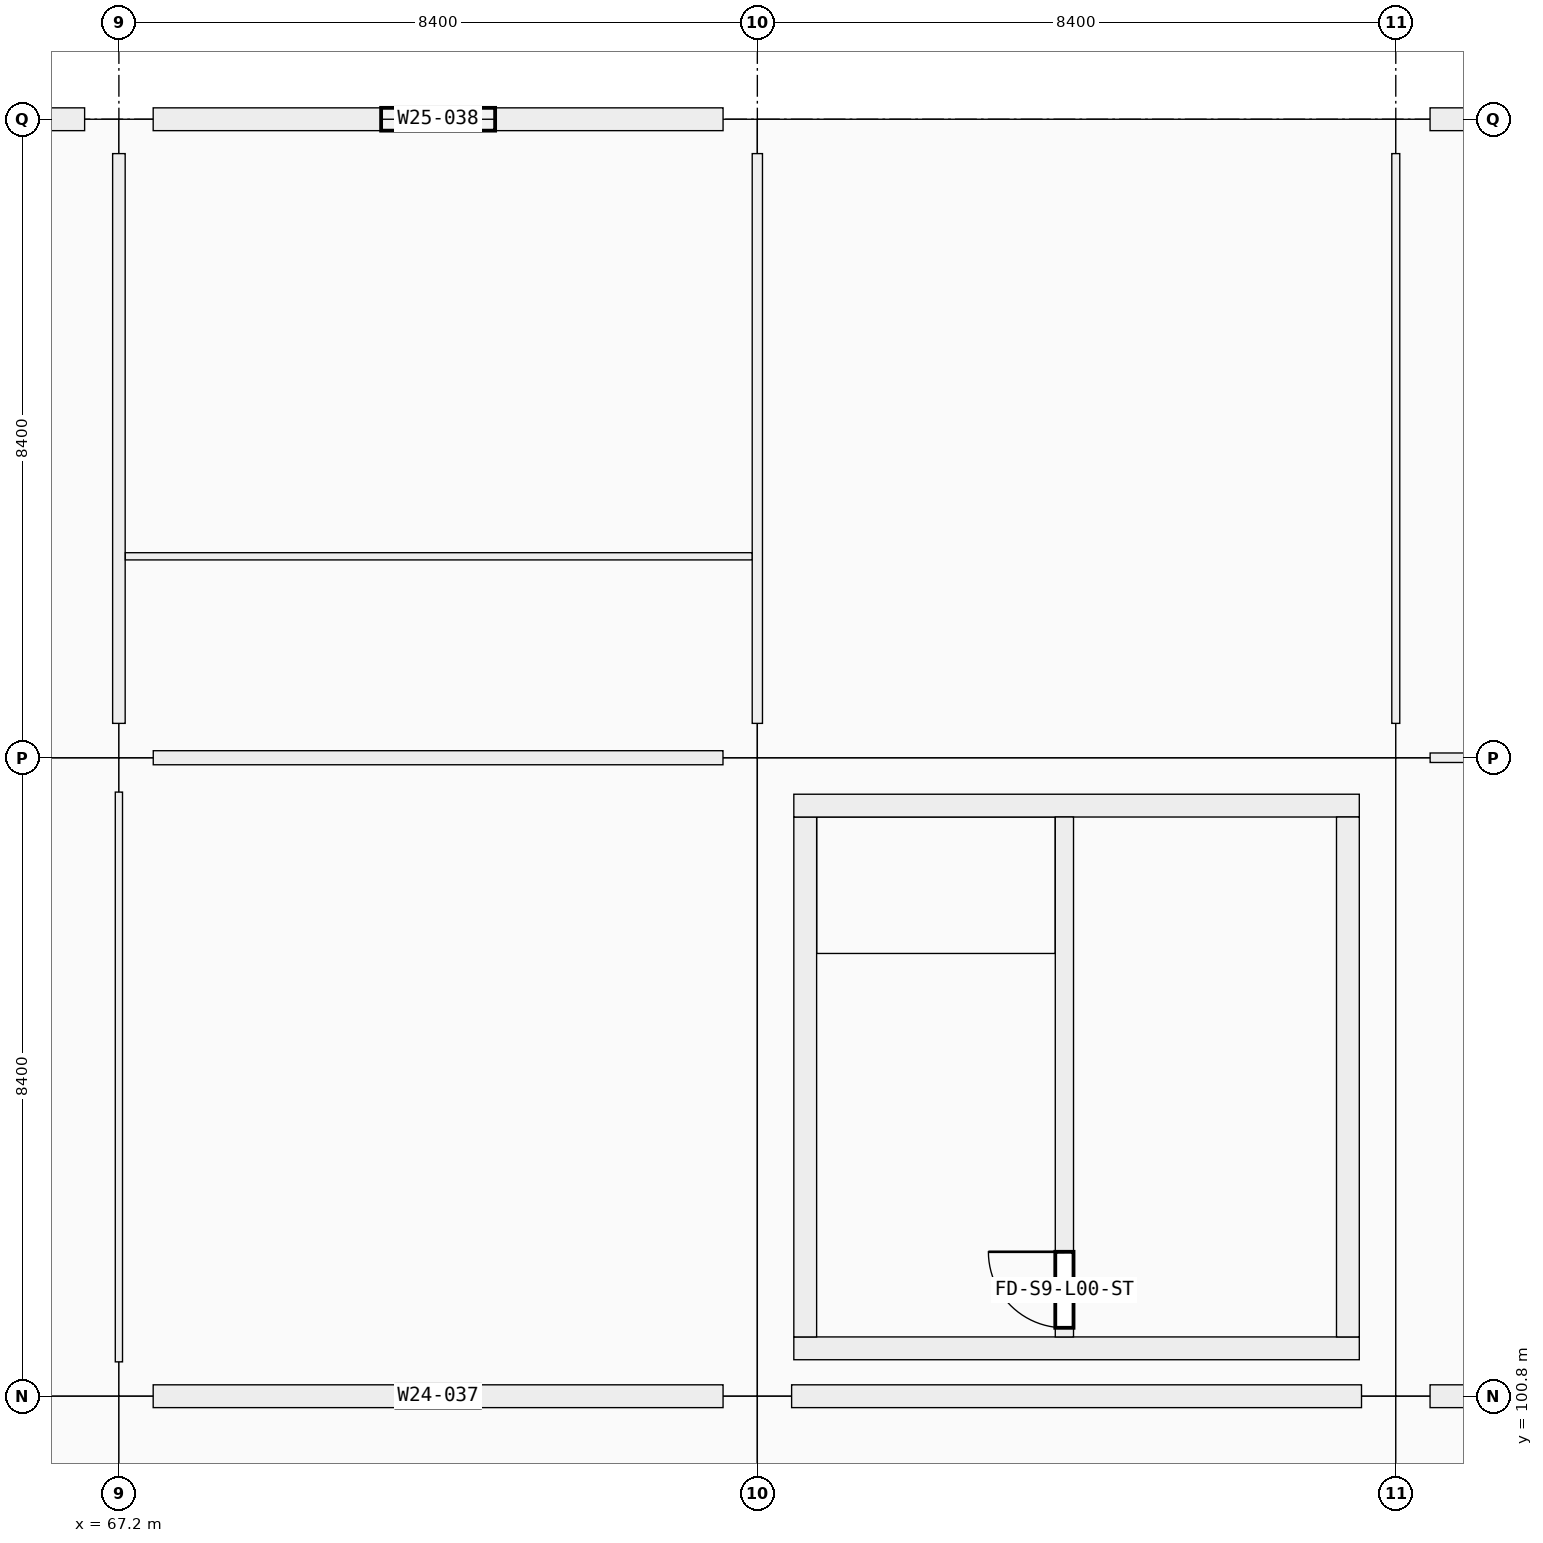
"""IFC4 building model, lengths in metres.
Left out: names, types, materials, properties, quantities, classifications, styles, units other than length and angle.
Written with IfcOpenShell. Run it as: python <this file> out.ifc"""

import sys

from ifc_helpers import new_model, si_unit, direction, frame, frame_2d, origin, origin_2d, place, context, subcontext, project, spatial, rectangle, extrude, element, fill, save


model = new_model("IFC4")
c1 = context("Model", 3, precision=1e-05, world=origin(), true_north=direction((0.0, 1.0)))
c2 = subcontext(c1, "Body", "Model", "MODEL_VIEW")
j1 = project(units=[si_unit("LENGTHUNIT", "METRE"), si_unit("PLANEANGLEUNIT", "RADIAN")], contexts=[c1])
p1 = place(None, origin())
s1 = spatial("IfcSite", under=j1, at=p1, CompositionType="ELEMENT")
p2 = place(p1, origin())
s2 = spatial("IfcBuilding", under=s1, at=p2, CompositionType="ELEMENT")
p3 = place(p2, origin())
s3 = spatial("IfcBuildingStorey", under=s2, at=p3, CompositionType="ELEMENT", Elevation=0.0)
for number, where, z_axis, x_axis in (
    (1, (67.2, 100.8, 0.0), (0.0, 0.0, 1.0), (1.0, 0.0, 0.0)),
    (2, (67.2, 109.2, 0.0), (0.0, 0.0, 1.0), (1.0, 0.0, 0.0)),
    (3, (67.2, 117.6, 0.0), (0.0, 0.0, 1.0), (1.0, 0.0, 0.0)),
    (4, (75.6, 100.8, 0.0), (0.0, 0.0, 1.0), (1.0, 0.0, 0.0)),
    (5, (75.6, 109.2, 0.0), (0.0, 0.0, 1.0), (1.0, 0.0, 0.0)),
    (6, (75.6, 117.6, 0.0), (0.0, 0.0, 1.0), (1.0, 0.0, 0.0)),
    (7, (84.0, 100.8, 0.0), (0.0, 0.0, 1.0), (1.0, 0.0, 0.0)),
    (8, (84.0, 109.2, 0.0), (0.0, 0.0, 1.0), (1.0, 0.0, 0.0)),
    (9, (84.0, 117.6, 0.0), (0.0, 0.0, 1.0), (1.0, 0.0, 0.0)),
):
    element("IfcColumn", number, at=place(p3, frame(where, z_axis=z_axis, x_axis=x_axis)), inside=s3, PredefinedType="COLUMN", context=c2, shape_type="SweptSolid", body=[
        extrude(rectangle(XDim=0.9, YDim=0.9, at=origin_2d()), origin(), (0.0, 0.0, 1.0), 5.76),
    ])
p4 = place(p3, frame((59.251, 117.6, 0.0), z_axis=(0.0, 0.0, 1.0), x_axis=(1.0, 0.0, 0.0)))
e10 = element("IfcWall", 10, at=p4, inside=s3, PredefinedType="SOLIDWALL", context=c2, shape_type="SweptSolid", body=[
    extrude(rectangle(XDim=7.498, YDim=0.3, at=frame_2d((3.749, 0.0))), origin(), (0.0, 0.0, 1.0), 4.7),
])
p5 = place(p4, frame((2.599, 0.0, 0.0)))
e11 = element("IfcOpeningElement", 11, at=p5, cuts=e10, PredefinedType="OPENING", context=c2, shape_type="SweptSolid", body=[
    extrude(rectangle(XDim=2.3, YDim=2.3, at=frame_2d((1.15, 1.15))), frame((0.0, 0.15, 0.0), z_axis=(0.0, -1.0, 0.0), x_axis=(1.0, 0.0, 0.0)), (0.0, 0.0, 1.0), 0.3),
])
p6 = place(p3, frame((75.149, 100.8, 0.0), z_axis=(0.0, 0.0, 1.0), x_axis=(-1.0, 0.0, 0.0)))
e12 = element("IfcWall", 12, at=p6, inside=s3, PredefinedType="SOLIDWALL", context=c2, shape_type="SweptSolid", body=[
    extrude(rectangle(XDim=7.498, YDim=0.3, at=frame_2d((3.749, 0.0))), origin(), (0.0, 0.0, 1.0), 4.7),
])
p7 = place(p6, frame((3.199, 0.0, 0.9)))
e13 = element("IfcOpeningElement", 13, at=p7, cuts=e12, PredefinedType="OPENING", context=c2, shape_type="SweptSolid", body=[
    extrude(rectangle(XDim=1.1, YDim=1.5, at=frame_2d((0.55, 0.75))), frame((0.0, 0.15, 0.0), z_axis=(0.0, -1.0, 0.0), x_axis=(1.0, 0.0, 0.0)), (0.0, 0.0, 1.0), 0.3),
])
p8 = place(p3, frame((67.651, 117.6, 0.0), z_axis=(0.0, 0.0, 1.0), x_axis=(1.0, 0.0, 0.0)))
e14 = element("IfcWall", 14, at=p8, inside=s3, PredefinedType="SOLIDWALL", context=c2, shape_type="SweptSolid", body=[
    extrude(rectangle(XDim=7.498, YDim=0.3, at=frame_2d((3.749, 0.0))), origin(), (0.0, 0.0, 1.0), 4.7),
])
p9 = place(p8, frame((2.999, 0.0, 0.9)))
e15 = element("IfcOpeningElement", 15, at=p9, cuts=e14, PredefinedType="OPENING", context=c2, shape_type="SweptSolid", body=[
    extrude(rectangle(XDim=1.5, YDim=1.2, at=frame_2d((0.75, 0.6))), frame((0.0, 0.15, 0.0), z_axis=(0.0, -1.0, 0.0), x_axis=(1.0, 0.0, 0.0)), (0.0, 0.0, 1.0), 0.3),
])
p10 = place(p3, frame((83.549, 100.8, 0.0), z_axis=(0.0, 0.0, 1.0), x_axis=(-1.0, 0.0, 0.0)))
e16 = element("IfcWall", 16, at=p10, inside=s3, PredefinedType="SOLIDWALL", context=c2, shape_type="SweptSolid", body=[
    extrude(rectangle(XDim=7.498, YDim=0.3, at=frame_2d((3.749, 0.0))), origin(), (0.0, 0.0, 1.0), 4.7),
])
p11 = place(p3, frame((91.949, 100.8, 0.0), z_axis=(0.0, 0.0, 1.0), x_axis=(-1.0, 0.0, 0.0)))
e17 = element("IfcWall", 17, at=p11, inside=s3, PredefinedType="SOLIDWALL", context=c2, shape_type="SweptSolid", body=[
    extrude(rectangle(XDim=7.498, YDim=0.3, at=frame_2d((3.749, 0.0))), origin(), (0.0, 0.0, 1.0), 4.7),
])
p12 = place(p11, frame((2.899, 0.0, 0.9)))
e18 = element("IfcOpeningElement", 18, at=p12, cuts=e17, PredefinedType="OPENING", context=c2, shape_type="SweptSolid", body=[
    extrude(rectangle(XDim=1.7, YDim=1.85, at=frame_2d((0.85, 0.925))), frame((0.0, 0.15, 0.0), z_axis=(0.0, -1.0, 0.0), x_axis=(1.0, 0.0, 0.0)), (0.0, 0.0, 1.0), 0.3),
])
p13 = place(p3, frame((84.451, 117.6, 0.0), z_axis=(0.0, 0.0, 1.0), x_axis=(1.0, 0.0, 0.0)))
e19 = element("IfcWall", 19, at=p13, inside=s3, PredefinedType="SOLIDWALL", context=c2, shape_type="SweptSolid", body=[
    extrude(rectangle(XDim=7.498, YDim=0.3, at=frame_2d((3.749, 0.0))), origin(), (0.0, 0.0, 1.0), 4.7),
])
p14 = place(p13, frame((2.599, 0.0, 0.0)))
e20 = element("IfcOpeningElement", 20, at=p14, cuts=e19, PredefinedType="OPENING", context=c2, shape_type="SweptSolid", body=[
    extrude(rectangle(XDim=2.3, YDim=2.3, at=frame_2d((1.15, 1.15))), frame((0.0, 0.15, 0.0), z_axis=(0.0, -1.0, 0.0), x_axis=(1.0, 0.0, 0.0)), (0.0, 0.0, 1.0), 0.3),
])
p15 = place(p3, frame((83.52, 101.43, 0.0), z_axis=(0.0, 0.0, 1.0), x_axis=(-1.0, 0.0, 0.0)))
e21 = element("IfcWall", 21, at=p15, inside=s3, PredefinedType="SHEAR", context=c2, shape_type="SweptSolid", body=[
    extrude(rectangle(XDim=7.44, YDim=0.3, at=frame_2d((3.72, 0.0))), origin(), (0.0, 0.0, 1.0), 5.76),
])
p16 = place(p3, frame((76.23, 101.58, 0.0), z_axis=(0.0, 0.0, 1.0), x_axis=(0.0, 1.0, 0.0)))
e22 = element("IfcWall", 22, at=p16, inside=s3, PredefinedType="SHEAR", context=c2, shape_type="SweptSolid", body=[
    extrude(rectangle(XDim=6.84, YDim=0.3, at=frame_2d((3.42, 0.0))), origin(), (0.0, 0.0, 1.0), 5.76),
])
p17 = place(p3, frame((76.08, 108.57, 0.0), z_axis=(0.0, 0.0, 1.0), x_axis=(1.0, 0.0, 0.0)))
e23 = element("IfcWall", 23, at=p17, inside=s3, PredefinedType="SHEAR", context=c2, shape_type="SweptSolid", body=[
    extrude(rectangle(XDim=7.44, YDim=0.3, at=frame_2d((3.72, 0.0))), origin(), (0.0, 0.0, 1.0), 5.76),
])
p18 = place(p3, frame((83.37, 108.42, 0.0), z_axis=(0.0, 0.0, 1.0), x_axis=(0.0, -1.0, 0.0)))
e24 = element("IfcWall", 24, at=p18, inside=s3, PredefinedType="SHEAR", context=c2, shape_type="SweptSolid", body=[
    extrude(rectangle(XDim=6.84, YDim=0.3, at=frame_2d((3.42, 0.0))), origin(), (0.0, 0.0, 1.0), 5.76),
])
p19 = place(p18, frame((3.97, 0.0, 0.0)))
e25 = element("IfcOpeningElement", 25, at=p19, cuts=e24, PredefinedType="OPENING", context=c2, shape_type="SweptSolid", body=[
    extrude(rectangle(XDim=1.5, YDim=2.15, at=frame_2d((0.75, 1.075))), frame((0.0, 0.15, 0.0), z_axis=(0.0, -1.0, 0.0), x_axis=(1.0, 0.0, 0.0)), (0.0, 0.0, 1.0), 0.3),
])
p20 = place(p3, frame((79.64, 101.58, 0.0), z_axis=(0.0, 0.0, 1.0), x_axis=(0.0, 1.0, 0.0)))
e26 = element("IfcWall", 26, at=p20, inside=s3, PredefinedType="SHEAR", context=c2, shape_type="SweptSolid", body=[
    extrude(rectangle(XDim=6.84, YDim=0.24, at=frame_2d((3.42, 0.0))), origin(), (0.0, 0.0, 1.0), 5.76),
])
p21 = place(p20, frame((0.12, 0.0, 0.0)))
e27 = element("IfcOpeningElement", 27, at=p21, cuts=e26, PredefinedType="OPENING", context=c2, shape_type="SweptSolid", body=[
    extrude(rectangle(XDim=1.0, YDim=2.15, at=frame_2d((0.5, 1.075))), frame((0.0, 0.12, 0.0), z_axis=(0.0, -1.0, 0.0), x_axis=(1.0, 0.0, 0.0)), (0.0, 0.0, 1.0), 0.24),
])
p22 = place(p3, frame((67.652, 109.2, 0.0), z_axis=(0.0, 0.0, 1.0), x_axis=(1.0, 0.0, 0.0)))
e28 = element("IfcWall", 28, at=p22, inside=s3, PredefinedType="PARTITIONING", context=c2, shape_type="SweptSolid", body=[
    extrude(rectangle(XDim=7.496, YDim=0.185, at=frame_2d((3.748, 0.0))), origin(), (0.0, 0.0, 1.0), 3.66),
])
p23 = place(p3, frame((84.452, 109.2, 0.0), z_axis=(0.0, 0.0, 1.0), x_axis=(1.0, 0.0, 0.0)))
e29 = element("IfcWall", 29, at=p23, inside=s3, PredefinedType="PARTITIONING", context=c2, shape_type="SweptSolid", body=[
    extrude(rectangle(XDim=7.496, YDim=0.125, at=frame_2d((3.748, 0.0))), origin(), (0.0, 0.0, 1.0), 3.66),
])
p24 = place(p23, frame((3.218, 0.0, 0.0)))
e30 = element("IfcOpeningElement", 30, at=p24, cuts=e29, PredefinedType="OPENING", context=c2, shape_type="SweptSolid", body=[
    extrude(rectangle(XDim=1.06, YDim=2.25, at=frame_2d((0.53, 1.125))), frame((0.0, 0.062, 0.0), z_axis=(0.0, -1.0, 0.0), x_axis=(1.0, 0.0, 0.0)), (0.0, 0.0, 1.0), 0.125),
])
p25 = place(p3, frame((67.2, 101.252, 0.0), z_axis=(0.0, 0.0, 1.0), x_axis=(0.0, 1.0, 0.0)))
e31 = element("IfcWall", 31, at=p25, inside=s3, PredefinedType="PARTITIONING", context=c2, shape_type="SweptSolid", body=[
    extrude(rectangle(XDim=7.496, YDim=0.095, at=frame_2d((3.748, 0.0))), origin(), (0.0, 0.0, 1.0), 3.66),
])
p26 = place(p25, frame((3.238, 0.0, 0.0)))
e32 = element("IfcOpeningElement", 32, at=p26, cuts=e31, PredefinedType="OPENING", context=c2, shape_type="SweptSolid", body=[
    extrude(rectangle(XDim=1.02, YDim=2.2, at=frame_2d((0.51, 1.1))), frame((0.0, 0.047, 0.0), z_axis=(0.0, -1.0, 0.0), x_axis=(1.0, 0.0, 0.0)), (0.0, 0.0, 1.0), 0.095),
])
p27 = place(p3, frame((67.2, 109.652, 0.0), z_axis=(0.0, 0.0, 1.0), x_axis=(0.0, 1.0, 0.0)))
e33 = element("IfcWall", 33, at=p27, inside=s3, PredefinedType="PARTITIONING", context=c2, shape_type="SweptSolid", body=[
    extrude(rectangle(XDim=7.496, YDim=0.165, at=frame_2d((3.748, 0.0))), origin(), (0.0, 0.0, 1.0), 3.66),
])
p28 = place(p27, frame((0.553, 0.0, 0.0)))
e34 = element("IfcOpeningElement", 34, at=p28, cuts=e33, PredefinedType="OPENING", context=c2, shape_type="SweptSolid", body=[
    extrude(rectangle(XDim=0.92, YDim=2.1, at=frame_2d((0.46, 1.05))), frame((0.0, 0.083, 0.0), z_axis=(0.0, -1.0, 0.0), x_axis=(1.0, 0.0, 0.0)), (0.0, 0.0, 1.0), 0.165),
])
p29 = place(p27, frame((4.443, 0.0, 0.0)))
e35 = element("IfcOpeningElement", 35, at=p29, cuts=e33, PredefinedType="OPENING", context=c2, shape_type="SweptSolid", body=[
    extrude(rectangle(XDim=0.98, YDim=2.08, at=frame_2d((0.49, 1.04))), frame((0.0, 0.083, 0.0), z_axis=(0.0, -1.0, 0.0), x_axis=(1.0, 0.0, 0.0)), (0.0, 0.0, 1.0), 0.165),
])
p30 = place(p3, frame((75.6, 109.652, 0.0), z_axis=(0.0, 0.0, 1.0), x_axis=(0.0, 1.0, 0.0)))
e36 = element("IfcWall", 36, at=p30, inside=s3, PredefinedType="PARTITIONING", context=c2, shape_type="SweptSolid", body=[
    extrude(rectangle(XDim=7.496, YDim=0.135, at=frame_2d((3.748, 0.0))), origin(), (0.0, 0.0, 1.0), 3.66),
])
p31 = place(p3, frame((84.0, 109.652, 0.0), z_axis=(0.0, 0.0, 1.0), x_axis=(0.0, 1.0, 0.0)))
e37 = element("IfcWall", 37, at=p31, inside=s3, PredefinedType="PARTITIONING", context=c2, shape_type="SweptSolid", body=[
    extrude(rectangle(XDim=7.496, YDim=0.105, at=frame_2d((3.748, 0.0))), origin(), (0.0, 0.0, 1.0), 3.66),
])
p32 = place(p31, frame((3.288, 0.0, 0.0)))
e38 = element("IfcOpeningElement", 38, at=p32, cuts=e37, PredefinedType="OPENING", context=c2, shape_type="SweptSolid", body=[
    extrude(rectangle(XDim=0.92, YDim=2.15, at=frame_2d((0.46, 1.075))), frame((0.0, 0.052, 0.0), z_axis=(0.0, -1.0, 0.0), x_axis=(1.0, 0.0, 0.0)), (0.0, 0.0, 1.0), 0.105),
])
p33 = place(p3, frame((67.284, 111.85, 0.0), z_axis=(0.0, 0.0, 1.0), x_axis=(1.0, 0.0, 0.0)))
e39 = element("IfcWall", 39, at=p33, inside=s3, PredefinedType="PARTITIONING", context=c2, shape_type="SweptSolid", body=[
    extrude(rectangle(XDim=8.246, YDim=0.095, at=frame_2d((4.123, 0.0))), origin(), (0.0, 0.0, 1.0), 3.66),
])
p34 = place(p7, origin())
e40 = element("IfcWindow", 40, at=p34, inside=s3, PartitioningType="SINGLE_PANEL", PredefinedType="WINDOW", context=c2, shape_type="SweptSolid", body=[
    extrude(rectangle(XDim=1.1, YDim=1.5, at=frame_2d((0.55, 0.75))), frame((0.0, 0.03, 0.0), z_axis=(0.0, -1.0, 0.0), x_axis=(1.0, 0.0, 0.0)), (0.0, 0.0, 1.0), 0.06),
])
fill(e13, e40)
p35 = place(p9, origin())
e41 = element("IfcWindow", 41, at=p35, inside=s3, PartitioningType="SINGLE_PANEL", PredefinedType="WINDOW", context=c2, shape_type="SweptSolid", body=[
    extrude(rectangle(XDim=1.5, YDim=1.2, at=frame_2d((0.75, 0.6))), frame((0.0, 0.03, 0.0), z_axis=(0.0, -1.0, 0.0), x_axis=(1.0, 0.0, 0.0)), (0.0, 0.0, 1.0), 0.06),
])
fill(e15, e41)
p36 = place(p21, origin())
e42 = element("IfcDoor", 42, at=p36, inside=s3, OperationType="SINGLE_SWING_RIGHT", PredefinedType="DOOR", context=c2, shape_type="SweptSolid", body=[
    extrude(rectangle(XDim=1.0, YDim=2.15, at=frame_2d((0.5, 1.075))), frame((0.0, 0.025, 0.0), z_axis=(0.0, -1.0, 0.0), x_axis=(1.0, 0.0, 0.0)), (0.0, 0.0, 1.0), 0.05),
])
fill(e27, e42)
p37 = place(p19, origin())
e43 = element("IfcDoor", 43, at=p37, inside=s3, OperationType="DOUBLE_DOOR_SINGLE_SWING", PredefinedType="DOOR", context=c2, shape_type="SweptSolid", body=[
    extrude(rectangle(XDim=1.5, YDim=2.15, at=frame_2d((0.75, 1.075))), frame((0.0, 0.025, 0.0), z_axis=(0.0, -1.0, 0.0), x_axis=(1.0, 0.0, 0.0)), (0.0, 0.0, 1.0), 0.05),
])
fill(e25, e43)
p38 = place(p28, origin())
e44 = element("IfcDoor", 44, at=p38, inside=s3, OperationType="SINGLE_SWING_LEFT", PredefinedType="DOOR", context=c2, shape_type="SweptSolid", body=[
    extrude(rectangle(XDim=0.92, YDim=2.1, at=frame_2d((0.46, 1.05))), frame((0.0, 0.025, 0.0), z_axis=(0.0, -1.0, 0.0), x_axis=(1.0, 0.0, 0.0)), (0.0, 0.0, 1.0), 0.05),
])
fill(e34, e44)
p39 = place(p29, origin())
e45 = element("IfcDoor", 45, at=p39, inside=s3, OperationType="SINGLE_SWING_RIGHT", PredefinedType="DOOR", context=c2, shape_type="SweptSolid", body=[
    extrude(rectangle(XDim=0.98, YDim=2.08, at=frame_2d((0.49, 1.04))), frame((0.0, 0.025, 0.0), z_axis=(0.0, -1.0, 0.0), x_axis=(1.0, 0.0, 0.0)), (0.0, 0.0, 1.0), 0.05),
])
fill(e35, e45)
p40 = place(p26, origin())
e46 = element("IfcDoor", 46, at=p40, inside=s3, OperationType="SINGLE_SWING_LEFT", PredefinedType="DOOR", context=c2, shape_type="SweptSolid", body=[
    extrude(rectangle(XDim=1.02, YDim=2.2, at=frame_2d((0.51, 1.1))), frame((0.0, 0.025, 0.0), z_axis=(0.0, -1.0, 0.0), x_axis=(1.0, 0.0, 0.0)), (0.0, 0.0, 1.0), 0.05),
])
fill(e32, e46)
p41 = place(p32, origin())
e47 = element("IfcDoor", 47, at=p41, inside=s3, OperationType="SINGLE_SWING_LEFT", PredefinedType="DOOR", context=c2, shape_type="SweptSolid", body=[
    extrude(rectangle(XDim=0.92, YDim=2.15, at=frame_2d((0.46, 1.075))), frame((0.0, 0.025, 0.0), z_axis=(0.0, -1.0, 0.0), x_axis=(1.0, 0.0, 0.0)), (0.0, 0.0, 1.0), 0.05),
])
fill(e38, e47)
save(model, sys.argv[1])
